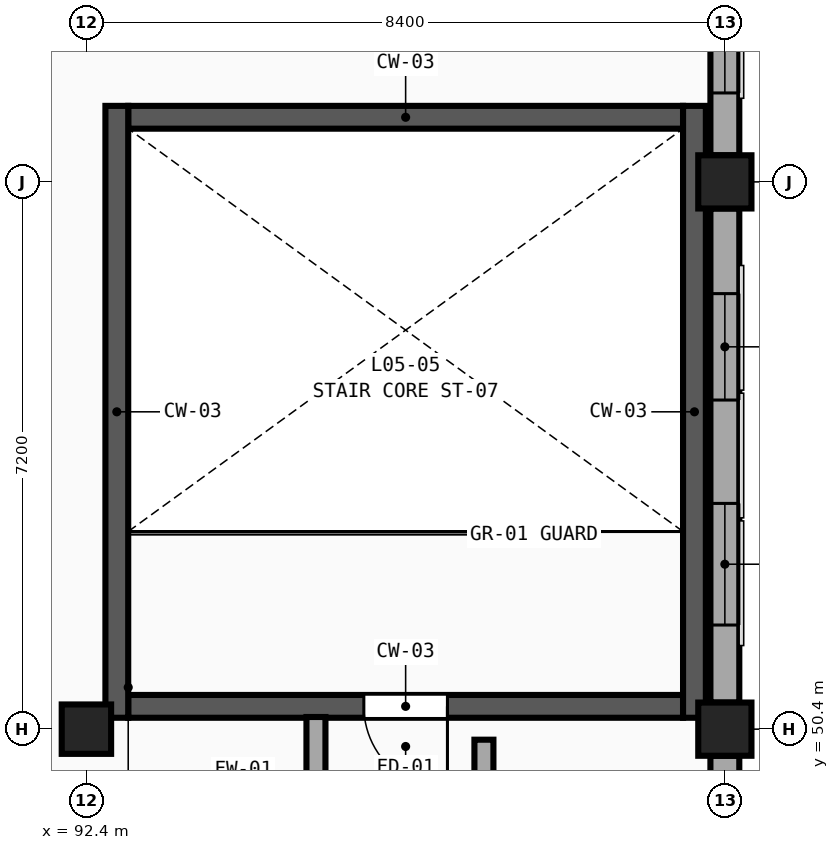
"""IFC4 building model, lengths in metres.
Left out: names, types, materials, properties, quantities, classifications, styles, units other than length and angle.
Written with IfcOpenShell. Run it as: python <this file> out.ifc"""

import sys

from ifc_helpers import new_model, si_unit, direction, frame, frame_2d, origin, origin_2d, place, context, subcontext, project, spatial, rectangle, circle, extrude, element, fill, save


model = new_model("IFC4")
c1 = context("Model", 3, precision=1e-05, world=origin(), true_north=direction((0.0, 1.0)))
c2 = subcontext(c1, "Body", "Model", "MODEL_VIEW")
j1 = project(units=[si_unit("LENGTHUNIT", "METRE"), si_unit("PLANEANGLEUNIT", "RADIAN")], contexts=[c1])
p1 = place(None, origin())
s1 = spatial("IfcSite", under=j1, at=p1, CompositionType="ELEMENT")
p2 = place(p1, origin())
s2 = spatial("IfcBuilding", under=s1, at=p2, CompositionType="ELEMENT")
p3 = place(p2, frame((0.0, 0.0, 23.4)))
s3 = spatial("IfcBuildingStorey", under=s2, at=p3, CompositionType="ELEMENT", Elevation=23.4)
for number, where, z_axis, x_axis in (
    (1, (100.8, 50.4, 0.0), (0.0, 0.0, 1.0), (1.0, 0.0, 0.0)),
    (2, (100.8, 57.6, 0.0), (0.0, 0.0, 1.0), (1.0, 0.0, 0.0)),
):
    element("IfcColumn", number, at=place(p3, frame(where, z_axis=z_axis, x_axis=x_axis)), inside=s3, PredefinedType="COLUMN", context=c2, shape_type="SweptSolid", body=[
        extrude(rectangle(XDim=0.7, YDim=0.7, at=origin_2d()), origin(), (0.0, 0.0, 1.0), 4.5),
    ])
p4 = place(p3, frame((92.4, 50.4, 0.0), z_axis=(0.0, 0.0, 1.0), x_axis=(1.0, 0.0, 0.0)))
e3 = element("IfcColumn", 3, at=p4, inside=s3, PredefinedType="COLUMN", context=c2, shape_type="SweptSolid", body=[
    extrude(circle(Radius=0.325, at=origin_2d()), origin(), (0.0, 0.0, 1.0), 4.5),
])
p5 = place(p3, frame((100.8, 50.05, 0.0), z_axis=(0.0, 0.0, 1.0), x_axis=(0.0, -1.0, 0.0)))
e4 = element("IfcWall", 4, at=p5, inside=s3, PredefinedType="SOLIDWALL", context=c2, shape_type="SweptSolid", body=[
    extrude(rectangle(XDim=6.5, YDim=0.38, at=frame_2d((3.25, 0.0))), origin(), (0.0, 0.0, 1.0), 3.66),
])
p6 = place(p5, frame((0.585, 0.0, 0.75)))
e5 = element("IfcOpeningElement", 5, at=p6, cuts=e4, PredefinedType="OPENING", context=c2, shape_type="SweptSolid", body=[
    extrude(rectangle(XDim=2.47, YDim=2.44, at=frame_2d((1.235, 1.22))), frame((0.0, 0.21, 0.0), z_axis=(0.0, -1.0, 0.0), x_axis=(1.0, 0.0, 0.0)), (0.0, 0.0, 1.0), 0.42),
])
p7 = place(p5, frame((4.08, 0.0, 0.75)))
e6 = element("IfcOpeningElement", 6, at=p7, cuts=e4, PredefinedType="OPENING", context=c2, shape_type="SweptSolid", body=[
    extrude(rectangle(XDim=1.2, YDim=2.62, at=frame_2d((0.6, 1.31))), frame((0.0, 0.21, 0.0), z_axis=(0.0, -1.0, 0.0), x_axis=(1.0, 0.0, 0.0)), (0.0, 0.0, 1.0), 0.42),
])
p8 = place(p3, frame((100.8, 57.25, 0.0), z_axis=(0.0, 0.0, 1.0), x_axis=(0.0, -1.0, 0.0)))
e7 = element("IfcWall", 7, at=p8, inside=s3, PredefinedType="SOLIDWALL", context=c2, shape_type="SweptSolid", body=[
    extrude(rectangle(XDim=6.5, YDim=0.38, at=frame_2d((3.25, 0.0))), origin(), (0.0, 0.0, 1.0), 3.66),
])
p9 = place(p8, frame((1.12, 0.0, 0.75)))
e8 = element("IfcOpeningElement", 8, at=p9, cuts=e7, PredefinedType="OPENING", context=c2, shape_type="SweptSolid", body=[
    extrude(rectangle(XDim=1.4, YDim=2.62, at=frame_2d((0.7, 1.31))), frame((0.0, 0.21, 0.0), z_axis=(0.0, -1.0, 0.0), x_axis=(1.0, 0.0, 0.0)), (0.0, 0.0, 1.0), 0.42),
])
p10 = place(p8, frame((3.88, 0.0, 0.75)))
e9 = element("IfcOpeningElement", 9, at=p10, cuts=e7, PredefinedType="OPENING", context=c2, shape_type="SweptSolid", body=[
    extrude(rectangle(XDim=1.6, YDim=2.62, at=frame_2d((0.8, 1.31))), frame((0.0, 0.21, 0.0), z_axis=(0.0, -1.0, 0.0), x_axis=(1.0, 0.0, 0.0)), (0.0, 0.0, 1.0), 0.42),
])
p11 = place(p3, frame((100.8, 64.45, 0.0), z_axis=(0.0, 0.0, 1.0), x_axis=(0.0, -1.0, 0.0)))
e10 = element("IfcWall", 10, at=p11, inside=s3, PredefinedType="SOLIDWALL", context=c2, shape_type="SweptSolid", body=[
    extrude(rectangle(XDim=6.5, YDim=0.38, at=frame_2d((3.25, 0.0))), origin(), (0.0, 0.0, 1.0), 3.66),
])
p12 = place(p11, frame((0.92, 0.0, 0.75)))
e11 = element("IfcOpeningElement", 11, at=p12, cuts=e10, PredefinedType="OPENING", context=c2, shape_type="SweptSolid", body=[
    extrude(rectangle(XDim=1.8, YDim=2.62, at=frame_2d((0.9, 1.31))), frame((0.0, 0.21, 0.0), z_axis=(0.0, -1.0, 0.0), x_axis=(1.0, 0.0, 0.0)), (0.0, 0.0, 1.0), 0.42),
])
p13 = place(p11, frame((3.68, 0.0, 0.75)))
e12 = element("IfcOpeningElement", 12, at=p13, cuts=e10, PredefinedType="OPENING", context=c2, shape_type="SweptSolid", body=[
    extrude(rectangle(XDim=2.0, YDim=2.62, at=frame_2d((1.0, 1.31))), frame((0.0, 0.21, 0.0), z_axis=(0.0, -1.0, 0.0), x_axis=(1.0, 0.0, 0.0)), (0.0, 0.0, 1.0), 0.42),
])
p14 = place(p3, frame((100.25, 50.7, 0.0), z_axis=(0.0, 0.0, 1.0), x_axis=(-1.0, 0.0, 0.0)))
e13 = element("IfcWall", 13, at=p14, inside=s3, PredefinedType="SHEAR", context=c2, shape_type="SweptSolid", body=[
    extrude(rectangle(XDim=7.3, YDim=0.3, at=frame_2d((3.65, 0.0))), origin(), (0.0, 0.0, 1.0), 4.5),
])
p15 = place(p14, frame((3.1, 0.0, 0.0)))
e14 = element("IfcOpeningElement", 14, at=p15, cuts=e13, PredefinedType="OPENING", context=c2, shape_type="SweptSolid", body=[
    extrude(rectangle(XDim=1.1, YDim=2.2, at=frame_2d((0.55, 1.1))), frame((0.0, 0.17, 0.0), z_axis=(0.0, -1.0, 0.0), x_axis=(1.0, 0.0, 0.0)), (0.0, 0.0, 1.0), 0.34),
])
p16 = place(p3, frame((92.95, 58.45, 0.0), z_axis=(0.0, 0.0, 1.0), x_axis=(1.0, 0.0, 0.0)))
e15 = element("IfcWall", 15, at=p16, inside=s3, PredefinedType="SHEAR", context=c2, shape_type="SweptSolid", body=[
    extrude(rectangle(XDim=7.3, YDim=0.3, at=frame_2d((3.65, 0.0))), origin(), (0.0, 0.0, 1.0), 4.5),
])
for number, where, z_axis, x_axis in (
    (16, (92.8, 58.6, 0.0), (0.0, 0.0, 1.0), (0.0, -1.0, 0.0)),
    (17, (100.4, 50.55, 0.0), (0.0, 0.0, 1.0), (0.0, 1.0, 0.0)),
):
    element("IfcWall", number, at=place(p3, frame(where, z_axis=z_axis, x_axis=x_axis)), inside=s3, PredefinedType="SHEAR", context=c2, shape_type="SweptSolid", body=[
        extrude(rectangle(XDim=8.05, YDim=0.3, at=frame_2d((4.025, 0.0))), origin(), (0.0, 0.0, 1.0), 4.5),
    ])
p17 = place(p3, frame((95.42, 47.255, 0.0), z_axis=(0.0, 0.0, 1.0), x_axis=(0.0, 1.0, 0.0)))
e18 = element("IfcWall", 18, at=p17, inside=s3, PredefinedType="SOLIDWALL", context=c2, shape_type="SweptSolid", body=[
    extrude(rectangle(XDim=3.305, YDim=0.25, at=frame_2d((1.653, 0.0))), origin(), (0.0, 0.0, 1.0), 4.21),
])
p18 = place(p17, frame((1.127, 0.0, 0.0)))
e19 = element("IfcOpeningElement", 19, at=p18, cuts=e18, PredefinedType="OPENING", context=c2, shape_type="SweptSolid", body=[
    extrude(rectangle(XDim=1.05, YDim=2.15, at=frame_2d((0.525, 1.075))), frame((0.0, 0.145, 0.0), z_axis=(0.0, -1.0, 0.0), x_axis=(1.0, 0.0, 0.0)), (0.0, 0.0, 1.0), 0.29),
])
p19 = place(p3, frame((97.63, 47.255, 0.0), z_axis=(0.0, 0.0, 1.0), x_axis=(0.0, 1.0, 0.0)))
e20 = element("IfcWall", 20, at=p19, inside=s3, PredefinedType="SOLIDWALL", context=c2, shape_type="SweptSolid", body=[
    extrude(rectangle(XDim=3.007, YDim=0.25, at=frame_2d((1.503, 0.0))), origin(), (0.0, 0.0, 1.0), 4.21),
])
p20 = place(p19, frame((0.978, 0.0, 0.0)))
e21 = element("IfcOpeningElement", 21, at=p20, cuts=e20, PredefinedType="OPENING", context=c2, shape_type="SweptSolid", body=[
    extrude(rectangle(XDim=1.05, YDim=2.15, at=frame_2d((0.525, 1.075))), frame((0.0, 0.145, 0.0), z_axis=(0.0, -1.0, 0.0), x_axis=(1.0, 0.0, 0.0)), (0.0, 0.0, 1.0), 0.29),
])
p21 = place(p9, origin())
e22 = element("IfcWindow", 22, at=p21, inside=s3, PartitioningType="DOUBLE_PANEL_VERTICAL", PredefinedType="WINDOW", context=c2, shape_type="SweptSolid", body=[
    extrude(rectangle(XDim=1.4, YDim=2.62, at=frame_2d((0.7, 1.31))), frame((0.0, 0.03, 0.0), z_axis=(0.0, -1.0, 0.0), x_axis=(1.0, 0.0, 0.0)), (0.0, 0.0, 1.0), 0.06),
])
fill(e8, e22)
p22 = place(p10, origin())
e23 = element("IfcWindow", 23, at=p22, inside=s3, PartitioningType="DOUBLE_PANEL_VERTICAL", PredefinedType="WINDOW", context=c2, shape_type="SweptSolid", body=[
    extrude(rectangle(XDim=1.6, YDim=2.62, at=frame_2d((0.8, 1.31))), frame((0.0, 0.03, 0.0), z_axis=(0.0, -1.0, 0.0), x_axis=(1.0, 0.0, 0.0)), (0.0, 0.0, 1.0), 0.06),
])
fill(e9, e23)
p23 = place(p13, origin())
e24 = element("IfcWindow", 24, at=p23, inside=s3, PartitioningType="TRIPLE_PANEL_VERTICAL", PredefinedType="WINDOW", context=c2, shape_type="SweptSolid", body=[
    extrude(rectangle(XDim=2.0, YDim=2.62, at=frame_2d((1.0, 1.31))), frame((0.0, 0.03, 0.0), z_axis=(0.0, -1.0, 0.0), x_axis=(1.0, 0.0, 0.0)), (0.0, 0.0, 1.0), 0.06),
])
fill(e12, e24)
p24 = place(p15, origin())
e25 = element("IfcDoor", 25, at=p24, inside=s3, OperationType="SINGLE_SWING_LEFT", PredefinedType="DOOR", context=c2, shape_type="SweptSolid", body=[
    extrude(rectangle(XDim=1.1, YDim=2.2, at=frame_2d((0.55, 1.1))), frame((0.0, 0.025, 0.0), z_axis=(0.0, -1.0, 0.0), x_axis=(1.0, 0.0, 0.0)), (0.0, 0.0, 1.0), 0.05),
])
fill(e14, e25)
save(model, sys.argv[1])
